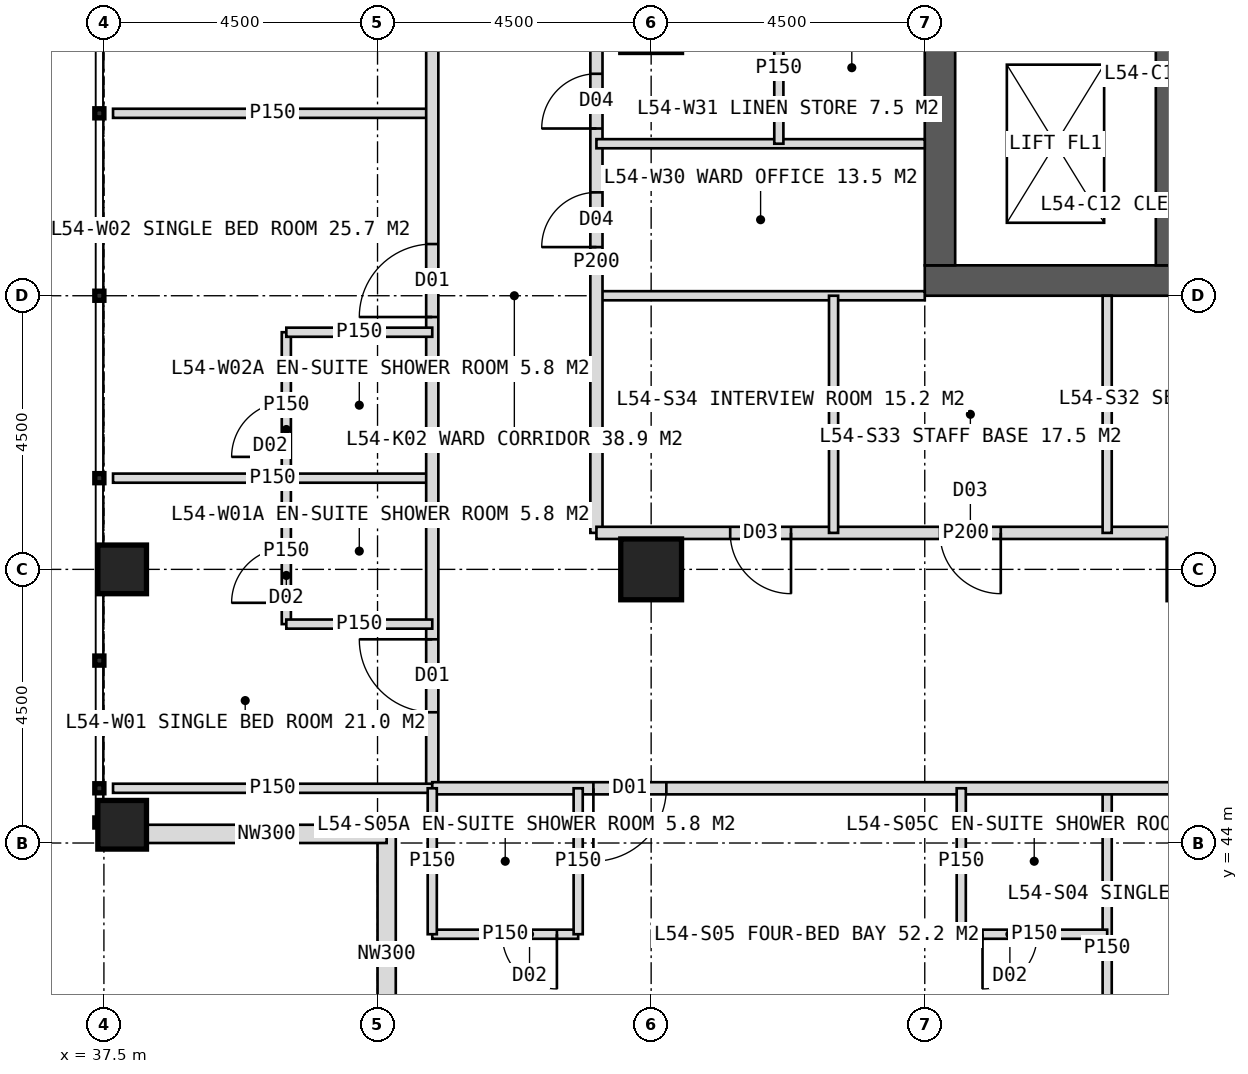
"""IFC4 building model, lengths in metres.
Left out: names, types, materials, properties, quantities, classifications, styles, units other than length and angle.
Written with IfcOpenShell. Run it as: python <this file> out.ifc"""

import sys

from ifc_helpers import new_model, si_unit, direction, frame, frame_2d, origin, origin_2d, place, context, subcontext, project, spatial, rectangle, hollow_rectangle, extrude, element, fill, save


model = new_model("IFC4")
c1 = context("Model", 3, precision=1e-05, world=origin(), true_north=direction((0.0, 1.0)))
c2 = subcontext(c1, "Body", "Model", "MODEL_VIEW")
j1 = project(units=[si_unit("LENGTHUNIT", "METRE"), si_unit("PLANEANGLEUNIT", "RADIAN")], contexts=[c1])
p1 = place(None, origin())
s1 = spatial("IfcSite", under=j1, at=p1, CompositionType="ELEMENT")
p2 = place(p1, origin())
s2 = spatial("IfcBuilding", under=s1, at=p2, CompositionType="ELEMENT")
p3 = place(p2, frame((0.0, 0.0, 225.0)))
s3 = spatial("IfcBuildingStorey", under=s2, at=p3, CompositionType="ELEMENT", Elevation=225.0)
p4 = place(p3, frame((51.0, 53.25, 0.0), z_axis=(0.0, 0.0, 1.0), x_axis=(1.0, 0.0, 0.0)))
e1 = element("IfcWall", 1, at=p4, inside=s3, PredefinedType="SHEAR", context=c2, shape_type="SweptSolid", body=[
    extrude(rectangle(XDim=18.0, YDim=0.5, at=frame_2d((9.0, 0.0))), origin(), (0.0, 0.0, 1.0), 4.0),
])
p5 = place(p4, frame((8.1, 0.0, 0.0)))
e2 = element("IfcOpeningElement", 2, at=p5, cuts=e1, PredefinedType="OPENING", context=c2, shape_type="SweptSolid", body=[
    extrude(rectangle(XDim=1.8, YDim=2.2, at=frame_2d((0.9, 1.1))), frame((0.0, 0.26, 0.0), z_axis=(0.0, -1.0, 0.0), x_axis=(1.0, 0.0, 0.0)), (0.0, 0.0, 1.0), 0.52),
])
p6 = place(p3, frame((51.25, 53.5, 0.0), z_axis=(0.0, 0.0, 1.0), x_axis=(0.0, 1.0, 0.0)))
e3 = element("IfcWall", 3, at=p6, inside=s3, PredefinedType="SHEAR", context=c2, shape_type="SweptSolid", body=[
    extrude(rectangle(XDim=17.0, YDim=0.5, at=frame_2d((8.5, 0.0))), origin(), (0.0, 0.0, 1.0), 4.0),
])
p7 = place(p6, frame((6.1, 0.0, 0.0)))
e4 = element("IfcOpeningElement", 4, at=p7, cuts=e3, PredefinedType="OPENING", context=c2, shape_type="SweptSolid", body=[
    extrude(rectangle(XDim=1.5, YDim=2.2, at=frame_2d((0.75, 1.1))), frame((0.0, 0.26, 0.0), z_axis=(0.0, -1.0, 0.0), x_axis=(1.0, 0.0, 0.0)), (0.0, 0.0, 1.0), 0.52),
])
p8 = place(p3, frame((54.95, 53.5, 0.0), z_axis=(0.0, 0.0, 1.0), x_axis=(0.0, 1.0, 0.0)))
e5 = element("IfcWall", 5, at=p8, inside=s3, PredefinedType="SHEAR", context=c2, shape_type="SweptSolid", body=[
    extrude(rectangle(XDim=17.0, YDim=0.3, at=frame_2d((8.5, 0.0))), origin(), (0.0, 0.0, 1.0), 4.0),
])
p9 = place(p3, frame((46.5, 48.5, 0.0), z_axis=(0.0, 0.0, 1.0), x_axis=(1.0, 0.0, 0.0)))
e6 = element("IfcColumn", 6, at=p9, inside=s3, PredefinedType="COLUMN", context=c2, shape_type="SweptSolid", body=[
    extrude(hollow_rectangle(XDim=1.0, YDim=1.0, WallThickness=0.1, at=origin_2d()), origin(), (0.0, 0.0, 1.0), 4.0),
])
for number, where, z_axis, x_axis in (
    (7, (37.8, 44.3, 0.0), (0.0, 0.0, 1.0), (1.0, 0.0, 0.0)),
    (8, (37.8, 48.5, 0.0), (0.0, 0.0, 1.0), (1.0, 0.0, 0.0)),
):
    element("IfcColumn", number, at=place(p3, frame(where, z_axis=z_axis, x_axis=x_axis)), inside=s3, PredefinedType="COLUMN", context=c2, shape_type="SweptSolid", body=[
        extrude(hollow_rectangle(XDim=0.8, YDim=0.8, WallThickness=0.08, at=origin_2d()), origin(), (0.0, 0.0, 1.0), 4.0),
    ])
for number, where, z_axis, x_axis in (
    (9, (42.15, 40.2, 0.0), (0.0, 0.0, 1.0), (0.0, 1.0, 0.0)),
    (10, (42.15, 44.15, 0.0), (0.0, 0.0, 1.0), (-1.0, 0.0, 0.0)),
):
    element("IfcWall", number, at=place(p3, frame(where, z_axis=z_axis, x_axis=x_axis)), inside=s3, PredefinedType="ELEMENTEDWALL", context=c2, shape_type="SweptSolid", body=[
        extrude(rectangle(XDim=3.95, YDim=0.3, at=frame_2d((1.975, 0.0))), origin(), (0.0, 0.0, 1.0), 2.85),
    ])
for number, where, z_axis, x_axis in (
    (11, (42.9, 50.0, 0.0), (0.0, 0.0, 1.0), (-1.0, 0.0, 0.0)),
    (12, (42.9, 56.0, 0.0), (0.0, 0.0, 1.0), (-1.0, 0.0, 0.0)),
):
    element("IfcWall", number, at=place(p3, frame(where, z_axis=z_axis, x_axis=x_axis)), inside=s3, PredefinedType="PARTITIONING", context=c2, shape_type="SweptSolid", body=[
        extrude(rectangle(XDim=5.25, YDim=0.15, at=frame_2d((2.625, 0.0))), origin(), (0.0, 0.0, 1.0), 3.75),
    ])
p10 = place(p3, frame((42.9, 44.9, 0.0), z_axis=(0.0, 0.0, 1.0), x_axis=(0.0, 1.0, 0.0)))
e13 = element("IfcWall", 13, at=p10, inside=s3, PredefinedType="PARTITIONING", context=c2, shape_type="SweptSolid", body=[
    extrude(rectangle(XDim=34.2, YDim=0.2, at=frame_2d((17.1, 0.0))), origin(), (0.0, 0.0, 1.0), 3.75),
])
p11 = place(p10, frame((1.25, 0.0, 0.0)))
e14 = element("IfcOpeningElement", 14, at=p11, cuts=e13, PredefinedType="OPENING", context=c2, shape_type="SweptSolid", body=[
    extrude(rectangle(XDim=1.2, YDim=2.2, at=frame_2d((0.6, 1.1))), frame((0.0, 0.11, 0.0), z_axis=(0.0, -1.0, 0.0), x_axis=(1.0, 0.0, 0.0)), (0.0, 0.0, 1.0), 0.22),
])
p12 = place(p10, frame((7.75, 0.0, 0.0)))
e15 = element("IfcOpeningElement", 15, at=p12, cuts=e13, PredefinedType="OPENING", context=c2, shape_type="SweptSolid", body=[
    extrude(rectangle(XDim=1.2, YDim=2.2, at=frame_2d((0.6, 1.1))), frame((0.0, 0.11, 0.0), z_axis=(0.0, -1.0, 0.0), x_axis=(1.0, 0.0, 0.0)), (0.0, 0.0, 1.0), 0.22),
])
p13 = place(p10, frame((13.6, 0.0, 0.0)))
e16 = element("IfcOpeningElement", 16, at=p13, cuts=e13, PredefinedType="OPENING", context=c2, shape_type="SweptSolid", body=[
    extrude(rectangle(XDim=1.0, YDim=2.1, at=frame_2d((0.5, 1.05))), frame((0.0, 0.11, 0.0), z_axis=(0.0, -1.0, 0.0), x_axis=(1.0, 0.0, 0.0)), (0.0, 0.0, 1.0), 0.22),
])
p14 = place(p10, frame((19.75, 0.0, 0.0)))
e17 = element("IfcOpeningElement", 17, at=p14, cuts=e13, PredefinedType="OPENING", context=c2, shape_type="SweptSolid", body=[
    extrude(rectangle(XDim=1.2, YDim=2.2, at=frame_2d((0.6, 1.1))), frame((0.0, 0.11, 0.0), z_axis=(0.0, -1.0, 0.0), x_axis=(1.0, 0.0, 0.0)), (0.0, 0.0, 1.0), 0.22),
])
p15 = place(p10, frame((30.35, 0.0, 0.0)))
e18 = element("IfcOpeningElement", 18, at=p15, cuts=e13, PredefinedType="OPENING", context=c2, shape_type="SweptSolid", body=[
    extrude(rectangle(XDim=1.2, YDim=2.2, at=frame_2d((0.6, 1.1))), frame((0.0, 0.11, 0.0), z_axis=(0.0, -1.0, 0.0), x_axis=(1.0, 0.0, 0.0)), (0.0, 0.0, 1.0), 0.22),
])
p16 = place(p3, frame((42.9, 44.9, 0.0), z_axis=(0.0, 0.0, 1.0), x_axis=(-1.0, 0.0, 0.0)))
e19 = element("IfcWall", 19, at=p16, inside=s3, PredefinedType="PARTITIONING", context=c2, shape_type="SweptSolid", body=[
    extrude(rectangle(XDim=5.25, YDim=0.15, at=frame_2d((2.625, 0.0))), origin(), (0.0, 0.0, 1.0), 3.75),
])
p17 = place(p3, frame((40.5, 47.6, 0.0), z_axis=(0.0, 0.0, 1.0), x_axis=(0.0, 1.0, 0.0)))
e20 = element("IfcWall", 20, at=p17, inside=s3, PredefinedType="PARTITIONING", context=c2, shape_type="SweptSolid", body=[
    extrude(rectangle(XDim=2.4, YDim=0.15, at=frame_2d((1.2, 0.0))), origin(), (0.0, 0.0, 1.0), 3.75),
])
p18 = place(p17, frame((0.35, 0.0, 0.0)))
e21 = element("IfcOpeningElement", 21, at=p18, cuts=e20, PredefinedType="OPENING", context=c2, shape_type="SweptSolid", body=[
    extrude(rectangle(XDim=0.9, YDim=2.1, at=frame_2d((0.45, 1.05))), frame((0.0, 0.085, 0.0), z_axis=(0.0, -1.0, 0.0), x_axis=(1.0, 0.0, 0.0)), (0.0, 0.0, 1.0), 0.17),
])
p19 = place(p3, frame((42.9, 47.6, 0.0), z_axis=(0.0, 0.0, 1.0), x_axis=(-1.0, 0.0, 0.0)))
e22 = element("IfcWall", 22, at=p19, inside=s3, PredefinedType="PARTITIONING", context=c2, shape_type="SweptSolid", body=[
    extrude(rectangle(XDim=2.4, YDim=0.15, at=frame_2d((1.2, 0.0))), origin(), (0.0, 0.0, 1.0), 3.75),
])
p20 = place(p3, frame((40.5, 50.0, 0.0), z_axis=(0.0, 0.0, 1.0), x_axis=(0.0, 1.0, 0.0)))
e23 = element("IfcWall", 23, at=p20, inside=s3, PredefinedType="PARTITIONING", context=c2, shape_type="SweptSolid", body=[
    extrude(rectangle(XDim=2.4, YDim=0.15, at=frame_2d((1.2, 0.0))), origin(), (0.0, 0.0, 1.0), 3.75),
])
p21 = place(p20, frame((0.35, 0.0, 0.0)))
e24 = element("IfcOpeningElement", 24, at=p21, cuts=e23, PredefinedType="OPENING", context=c2, shape_type="SweptSolid", body=[
    extrude(rectangle(XDim=0.9, YDim=2.1, at=frame_2d((0.45, 1.05))), frame((0.0, 0.085, 0.0), z_axis=(0.0, -1.0, 0.0), x_axis=(1.0, 0.0, 0.0)), (0.0, 0.0, 1.0), 0.17),
])
p22 = place(p3, frame((42.9, 52.4, 0.0), z_axis=(0.0, 0.0, 1.0), x_axis=(-1.0, 0.0, 0.0)))
e25 = element("IfcWall", 25, at=p22, inside=s3, PredefinedType="PARTITIONING", context=c2, shape_type="SweptSolid", body=[
    extrude(rectangle(XDim=2.4, YDim=0.15, at=frame_2d((1.2, 0.0))), origin(), (0.0, 0.0, 1.0), 3.75),
])
p23 = place(p3, frame((51.0, 53.0, 0.0), z_axis=(0.0, 0.0, 1.0), x_axis=(-1.0, 0.0, 0.0)))
e26 = element("IfcWall", 26, at=p23, inside=s3, PredefinedType="PARTITIONING", context=c2, shape_type="SweptSolid", body=[
    extrude(rectangle(XDim=5.4, YDim=0.15, at=frame_2d((2.7, 0.0))), origin(), (0.0, 0.0, 1.0), 3.75),
])
p24 = place(p3, frame((45.6, 49.1, 0.0), z_axis=(0.0, 0.0, 1.0), x_axis=(0.0, 1.0, 0.0)))
e27 = element("IfcWall", 27, at=p24, inside=s3, PredefinedType="PARTITIONING", context=c2, shape_type="SweptSolid", body=[
    extrude(rectangle(XDim=8.9, YDim=0.2, at=frame_2d((4.45, 0.0))), origin(), (0.0, 0.0, 1.0), 3.75),
])
p25 = place(p24, frame((4.7, 0.0, 0.0)))
e28 = element("IfcOpeningElement", 28, at=p25, cuts=e27, PredefinedType="OPENING", context=c2, shape_type="SweptSolid", body=[
    extrude(rectangle(XDim=0.9, YDim=2.1, at=frame_2d((0.45, 1.05))), frame((0.0, 0.11, 0.0), z_axis=(0.0, -1.0, 0.0), x_axis=(1.0, 0.0, 0.0)), (0.0, 0.0, 1.0), 0.22),
])
p26 = place(p24, frame((6.65, 0.0, 0.0)))
e29 = element("IfcOpeningElement", 29, at=p26, cuts=e27, PredefinedType="OPENING", context=c2, shape_type="SweptSolid", body=[
    extrude(rectangle(XDim=0.9, YDim=2.1, at=frame_2d((0.45, 1.05))), frame((0.0, 0.11, 0.0), z_axis=(0.0, -1.0, 0.0), x_axis=(1.0, 0.0, 0.0)), (0.0, 0.0, 1.0), 0.22),
])
p27 = place(p3, frame((51.0, 55.5, 0.0), z_axis=(0.0, 0.0, 1.0), x_axis=(-1.0, 0.0, 0.0)))
e30 = element("IfcWall", 30, at=p27, inside=s3, PredefinedType="PARTITIONING", context=c2, shape_type="SweptSolid", body=[
    extrude(rectangle(XDim=5.4, YDim=0.15, at=frame_2d((2.7, 0.0))), origin(), (0.0, 0.0, 1.0), 3.75),
])
p28 = place(p3, frame((48.6, 55.5, 0.0), z_axis=(0.0, 0.0, 1.0), x_axis=(0.0, 1.0, 0.0)))
e31 = element("IfcWall", 31, at=p28, inside=s3, PredefinedType="PARTITIONING", context=c2, shape_type="SweptSolid", body=[
    extrude(rectangle(XDim=2.5, YDim=0.15, at=frame_2d((1.25, 0.0))), origin(), (0.0, 0.0, 1.0), 3.75),
])
p29 = place(p3, frame((54.0, 44.9, 0.0), z_axis=(0.0, 0.0, 1.0), x_axis=(0.0, -1.0, 0.0)))
e32 = element("IfcWall", 32, at=p29, inside=s3, PredefinedType="PARTITIONING", context=c2, shape_type="SweptSolid", body=[
    extrude(rectangle(XDim=5.25, YDim=0.15, at=frame_2d((2.625, 0.0))), origin(), (0.0, 0.0, 1.0), 3.75),
])
p30 = place(p3, frame((77.1, 44.9, 0.0), z_axis=(0.0, 0.0, 1.0), x_axis=(-1.0, 0.0, 0.0)))
e33 = element("IfcWall", 33, at=p30, inside=s3, PredefinedType="PARTITIONING", context=c2, shape_type="SweptSolid", body=[
    extrude(rectangle(XDim=34.2, YDim=0.2, at=frame_2d((17.1, 0.0))), origin(), (0.0, 0.0, 1.0), 3.75),
])
p31 = place(p30, frame((1.25, 0.0, 0.0)))
e34 = element("IfcOpeningElement", 34, at=p31, cuts=e33, PredefinedType="OPENING", context=c2, shape_type="SweptSolid", body=[
    extrude(rectangle(XDim=1.2, YDim=2.2, at=frame_2d((0.6, 1.1))), frame((0.0, 0.11, 0.0), z_axis=(0.0, -1.0, 0.0), x_axis=(1.0, 0.0, 0.0)), (0.0, 0.0, 1.0), 0.22),
])
p32 = place(p30, frame((7.75, 0.0, 0.0)))
e35 = element("IfcOpeningElement", 35, at=p32, cuts=e33, PredefinedType="OPENING", context=c2, shape_type="SweptSolid", body=[
    extrude(rectangle(XDim=1.2, YDim=2.2, at=frame_2d((0.6, 1.1))), frame((0.0, 0.11, 0.0), z_axis=(0.0, -1.0, 0.0), x_axis=(1.0, 0.0, 0.0)), (0.0, 0.0, 1.0), 0.22),
])
p33 = place(p30, frame((13.25, 0.0, 0.0)))
e36 = element("IfcOpeningElement", 36, at=p33, cuts=e33, PredefinedType="OPENING", context=c2, shape_type="SweptSolid", body=[
    extrude(rectangle(XDim=1.2, YDim=2.2, at=frame_2d((0.6, 1.1))), frame((0.0, 0.11, 0.0), z_axis=(0.0, -1.0, 0.0), x_axis=(1.0, 0.0, 0.0)), (0.0, 0.0, 1.0), 0.22),
])
p34 = place(p30, frame((19.75, 0.0, 0.0)))
e37 = element("IfcOpeningElement", 37, at=p34, cuts=e33, PredefinedType="OPENING", context=c2, shape_type="SweptSolid", body=[
    extrude(rectangle(XDim=1.2, YDim=2.2, at=frame_2d((0.6, 1.1))), frame((0.0, 0.11, 0.0), z_axis=(0.0, -1.0, 0.0), x_axis=(1.0, 0.0, 0.0)), (0.0, 0.0, 1.0), 0.22),
])
p35 = place(p30, frame((30.35, 0.0, 0.0)))
e38 = element("IfcOpeningElement", 38, at=p35, cuts=e33, PredefinedType="OPENING", context=c2, shape_type="SweptSolid", body=[
    extrude(rectangle(XDim=1.2, YDim=2.2, at=frame_2d((0.6, 1.1))), frame((0.0, 0.11, 0.0), z_axis=(0.0, -1.0, 0.0), x_axis=(1.0, 0.0, 0.0)), (0.0, 0.0, 1.0), 0.22),
])
p36 = place(p3, frame((45.3, 42.5, 0.0), z_axis=(0.0, 0.0, 1.0), x_axis=(-1.0, 0.0, 0.0)))
e39 = element("IfcWall", 39, at=p36, inside=s3, PredefinedType="PARTITIONING", context=c2, shape_type="SweptSolid", body=[
    extrude(rectangle(XDim=2.4, YDim=0.15, at=frame_2d((1.2, 0.0))), origin(), (0.0, 0.0, 1.0), 3.75),
])
p37 = place(p36, frame((0.35, 0.0, 0.0)))
e40 = element("IfcOpeningElement", 40, at=p37, cuts=e39, PredefinedType="OPENING", context=c2, shape_type="SweptSolid", body=[
    extrude(rectangle(XDim=0.9, YDim=2.1, at=frame_2d((0.45, 1.05))), frame((0.0, 0.085, 0.0), z_axis=(0.0, -1.0, 0.0), x_axis=(1.0, 0.0, 0.0)), (0.0, 0.0, 1.0), 0.17),
])
p38 = place(p3, frame((45.3, 44.9, 0.0), z_axis=(0.0, 0.0, 1.0), x_axis=(0.0, -1.0, 0.0)))
e41 = element("IfcWall", 41, at=p38, inside=s3, PredefinedType="PARTITIONING", context=c2, shape_type="SweptSolid", body=[
    extrude(rectangle(XDim=2.4, YDim=0.15, at=frame_2d((1.2, 0.0))), origin(), (0.0, 0.0, 1.0), 3.75),
])
p39 = place(p3, frame((54.0, 42.5, 0.0), z_axis=(0.0, 0.0, 1.0), x_axis=(-1.0, 0.0, 0.0)))
e42 = element("IfcWall", 42, at=p39, inside=s3, PredefinedType="PARTITIONING", context=c2, shape_type="SweptSolid", body=[
    extrude(rectangle(XDim=2.4, YDim=0.15, at=frame_2d((1.2, 0.0))), origin(), (0.0, 0.0, 1.0), 3.75),
])
p40 = place(p39, frame((1.15, 0.0, 0.0)))
e43 = element("IfcOpeningElement", 43, at=p40, cuts=e42, PredefinedType="OPENING", context=c2, shape_type="SweptSolid", body=[
    extrude(rectangle(XDim=0.9, YDim=2.1, at=frame_2d((0.45, 1.05))), frame((0.0, 0.085, 0.0), z_axis=(0.0, -1.0, 0.0), x_axis=(1.0, 0.0, 0.0)), (0.0, 0.0, 1.0), 0.17),
])
for number, where, z_axis, x_axis in (
    (44, (51.6, 44.9, 0.0), (0.0, 0.0, 1.0), (0.0, -1.0, 0.0)),
    (45, (42.9, 44.9, 0.0), (0.0, 0.0, 1.0), (0.0, -1.0, 0.0)),
):
    element("IfcWall", number, at=place(p3, frame(where, z_axis=z_axis, x_axis=x_axis)), inside=s3, PredefinedType="PARTITIONING", context=c2, shape_type="SweptSolid", body=[
        extrude(rectangle(XDim=2.4, YDim=0.15, at=frame_2d((1.2, 0.0))), origin(), (0.0, 0.0, 1.0), 3.75),
    ])
p41 = place(p3, frame((57.75, 49.1, 0.0), z_axis=(0.0, 0.0, 1.0), x_axis=(-1.0, 0.0, 0.0)))
e46 = element("IfcWall", 46, at=p41, inside=s3, PredefinedType="PARTITIONING", context=c2, shape_type="SweptSolid", body=[
    extrude(rectangle(XDim=12.15, YDim=0.2, at=frame_2d((6.075, 0.0))), origin(), (0.0, 0.0, 1.0), 3.75),
])
p42 = place(p41, frame((0.325, 0.0, 0.0)))
e47 = element("IfcOpeningElement", 47, at=p42, cuts=e46, PredefinedType="OPENING", context=c2, shape_type="SweptSolid", body=[
    extrude(rectangle(XDim=1.0, YDim=2.1, at=frame_2d((0.5, 1.05))), frame((0.0, 0.11, 0.0), z_axis=(0.0, -1.0, 0.0), x_axis=(1.0, 0.0, 0.0)), (0.0, 0.0, 1.0), 0.22),
])
p43 = place(p41, frame((5.5, 0.0, 0.0)))
e48 = element("IfcOpeningElement", 48, at=p43, cuts=e46, PredefinedType="OPENING", context=c2, shape_type="SweptSolid", body=[
    extrude(rectangle(XDim=1.0, YDim=2.1, at=frame_2d((0.5, 1.05))), frame((0.0, 0.11, 0.0), z_axis=(0.0, -1.0, 0.0), x_axis=(1.0, 0.0, 0.0)), (0.0, 0.0, 1.0), 0.22),
])
p44 = place(p41, frame((8.95, 0.0, 0.0)))
e49 = element("IfcOpeningElement", 49, at=p44, cuts=e46, PredefinedType="OPENING", context=c2, shape_type="SweptSolid", body=[
    extrude(rectangle(XDim=1.0, YDim=2.1, at=frame_2d((0.5, 1.05))), frame((0.0, 0.11, 0.0), z_axis=(0.0, -1.0, 0.0), x_axis=(1.0, 0.0, 0.0)), (0.0, 0.0, 1.0), 0.22),
])
for number, where, z_axis, x_axis in (
    (50, (54.0, 53.0, 0.0), (0.0, 0.0, 1.0), (0.0, -1.0, 0.0)),
    (51, (49.5, 53.0, 0.0), (0.0, 0.0, 1.0), (0.0, -1.0, 0.0)),
):
    element("IfcWall", number, at=place(p3, frame(where, z_axis=z_axis, x_axis=x_axis)), inside=s3, PredefinedType="PARTITIONING", context=c2, shape_type="SweptSolid", body=[
        extrude(rectangle(XDim=3.9, YDim=0.15, at=frame_2d((1.95, 0.0))), origin(), (0.0, 0.0, 1.0), 3.75),
    ])
p45 = place(p11, origin())
e52 = element("IfcDoor", 52, at=p45, inside=s3, OperationType="SINGLE_SWING_RIGHT", PredefinedType="DOOR", context=c2, shape_type="SweptSolid", body=[
    extrude(rectangle(XDim=1.2, YDim=2.2, at=frame_2d((0.6, 1.1))), frame((0.0, 0.025, 0.0), z_axis=(0.0, -1.0, 0.0), x_axis=(1.0, 0.0, 0.0)), (0.0, 0.0, 1.0), 0.05),
])
fill(e14, e52)
p46 = place(p18, origin())
e53 = element("IfcDoor", 53, at=p46, inside=s3, OperationType="SINGLE_SWING_LEFT", PredefinedType="DOOR", context=c2, shape_type="SweptSolid", body=[
    extrude(rectangle(XDim=0.9, YDim=2.1, at=frame_2d((0.45, 1.05))), frame((0.0, 0.025, 0.0), z_axis=(0.0, -1.0, 0.0), x_axis=(1.0, 0.0, 0.0)), (0.0, 0.0, 1.0), 0.05),
])
fill(e21, e53)
p47 = place(p12, origin())
e54 = element("IfcDoor", 54, at=p47, inside=s3, OperationType="SINGLE_SWING_LEFT", PredefinedType="DOOR", context=c2, shape_type="SweptSolid", body=[
    extrude(rectangle(XDim=1.2, YDim=2.2, at=frame_2d((0.6, 1.1))), frame((0.0, 0.025, 0.0), z_axis=(0.0, -1.0, 0.0), x_axis=(1.0, 0.0, 0.0)), (0.0, 0.0, 1.0), 0.05),
])
fill(e15, e54)
p48 = place(p21, origin())
e55 = element("IfcDoor", 55, at=p48, inside=s3, OperationType="SINGLE_SWING_LEFT", PredefinedType="DOOR", context=c2, shape_type="SweptSolid", body=[
    extrude(rectangle(XDim=0.9, YDim=2.1, at=frame_2d((0.45, 1.05))), frame((0.0, 0.025, 0.0), z_axis=(0.0, -1.0, 0.0), x_axis=(1.0, 0.0, 0.0)), (0.0, 0.0, 1.0), 0.05),
])
fill(e24, e55)
p49 = place(p25, origin())
e56 = element("IfcDoor", 56, at=p49, inside=s3, OperationType="SINGLE_SWING_LEFT", PredefinedType="DOOR", context=c2, shape_type="SweptSolid", body=[
    extrude(rectangle(XDim=0.9, YDim=2.1, at=frame_2d((0.45, 1.05))), frame((0.0, 0.025, 0.0), z_axis=(0.0, -1.0, 0.0), x_axis=(1.0, 0.0, 0.0)), (0.0, 0.0, 1.0), 0.05),
])
fill(e28, e56)
p50 = place(p26, origin())
e57 = element("IfcDoor", 57, at=p50, inside=s3, OperationType="SINGLE_SWING_LEFT", PredefinedType="DOOR", context=c2, shape_type="SweptSolid", body=[
    extrude(rectangle(XDim=0.9, YDim=2.1, at=frame_2d((0.45, 1.05))), frame((0.0, 0.025, 0.0), z_axis=(0.0, -1.0, 0.0), x_axis=(1.0, 0.0, 0.0)), (0.0, 0.0, 1.0), 0.05),
])
fill(e29, e57)
p51 = place(p35, origin())
e58 = element("IfcDoor", 58, at=p51, inside=s3, OperationType="SINGLE_SWING_RIGHT", PredefinedType="DOOR", context=c2, shape_type="SweptSolid", body=[
    extrude(rectangle(XDim=1.2, YDim=2.2, at=frame_2d((0.6, 1.1))), frame((0.0, 0.025, 0.0), z_axis=(0.0, -1.0, 0.0), x_axis=(1.0, 0.0, 0.0)), (0.0, 0.0, 1.0), 0.05),
])
fill(e38, e58)
p52 = place(p37, origin())
e59 = element("IfcDoor", 59, at=p52, inside=s3, OperationType="SINGLE_SWING_LEFT", PredefinedType="DOOR", context=c2, shape_type="SweptSolid", body=[
    extrude(rectangle(XDim=0.9, YDim=2.1, at=frame_2d((0.45, 1.05))), frame((0.0, 0.025, 0.0), z_axis=(0.0, -1.0, 0.0), x_axis=(1.0, 0.0, 0.0)), (0.0, 0.0, 1.0), 0.05),
])
fill(e40, e59)
p53 = place(p40, origin())
e60 = element("IfcDoor", 60, at=p53, inside=s3, OperationType="SINGLE_SWING_RIGHT", PredefinedType="DOOR", context=c2, shape_type="SweptSolid", body=[
    extrude(rectangle(XDim=0.9, YDim=2.1, at=frame_2d((0.45, 1.05))), frame((0.0, 0.025, 0.0), z_axis=(0.0, -1.0, 0.0), x_axis=(1.0, 0.0, 0.0)), (0.0, 0.0, 1.0), 0.05),
])
fill(e43, e60)
p54 = place(p43, origin())
e61 = element("IfcDoor", 61, at=p54, inside=s3, OperationType="SINGLE_SWING_LEFT", PredefinedType="DOOR", context=c2, shape_type="SweptSolid", body=[
    extrude(rectangle(XDim=1.0, YDim=2.1, at=frame_2d((0.5, 1.05))), frame((0.0, 0.025, 0.0), z_axis=(0.0, -1.0, 0.0), x_axis=(1.0, 0.0, 0.0)), (0.0, 0.0, 1.0), 0.05),
])
fill(e48, e61)
p55 = place(p44, origin())
e62 = element("IfcDoor", 62, at=p55, inside=s3, OperationType="SINGLE_SWING_LEFT", PredefinedType="DOOR", context=c2, shape_type="SweptSolid", body=[
    extrude(rectangle(XDim=1.0, YDim=2.1, at=frame_2d((0.5, 1.05))), frame((0.0, 0.025, 0.0), z_axis=(0.0, -1.0, 0.0), x_axis=(1.0, 0.0, 0.0)), (0.0, 0.0, 1.0), 0.05),
])
fill(e49, e62)
save(model, sys.argv[1])
